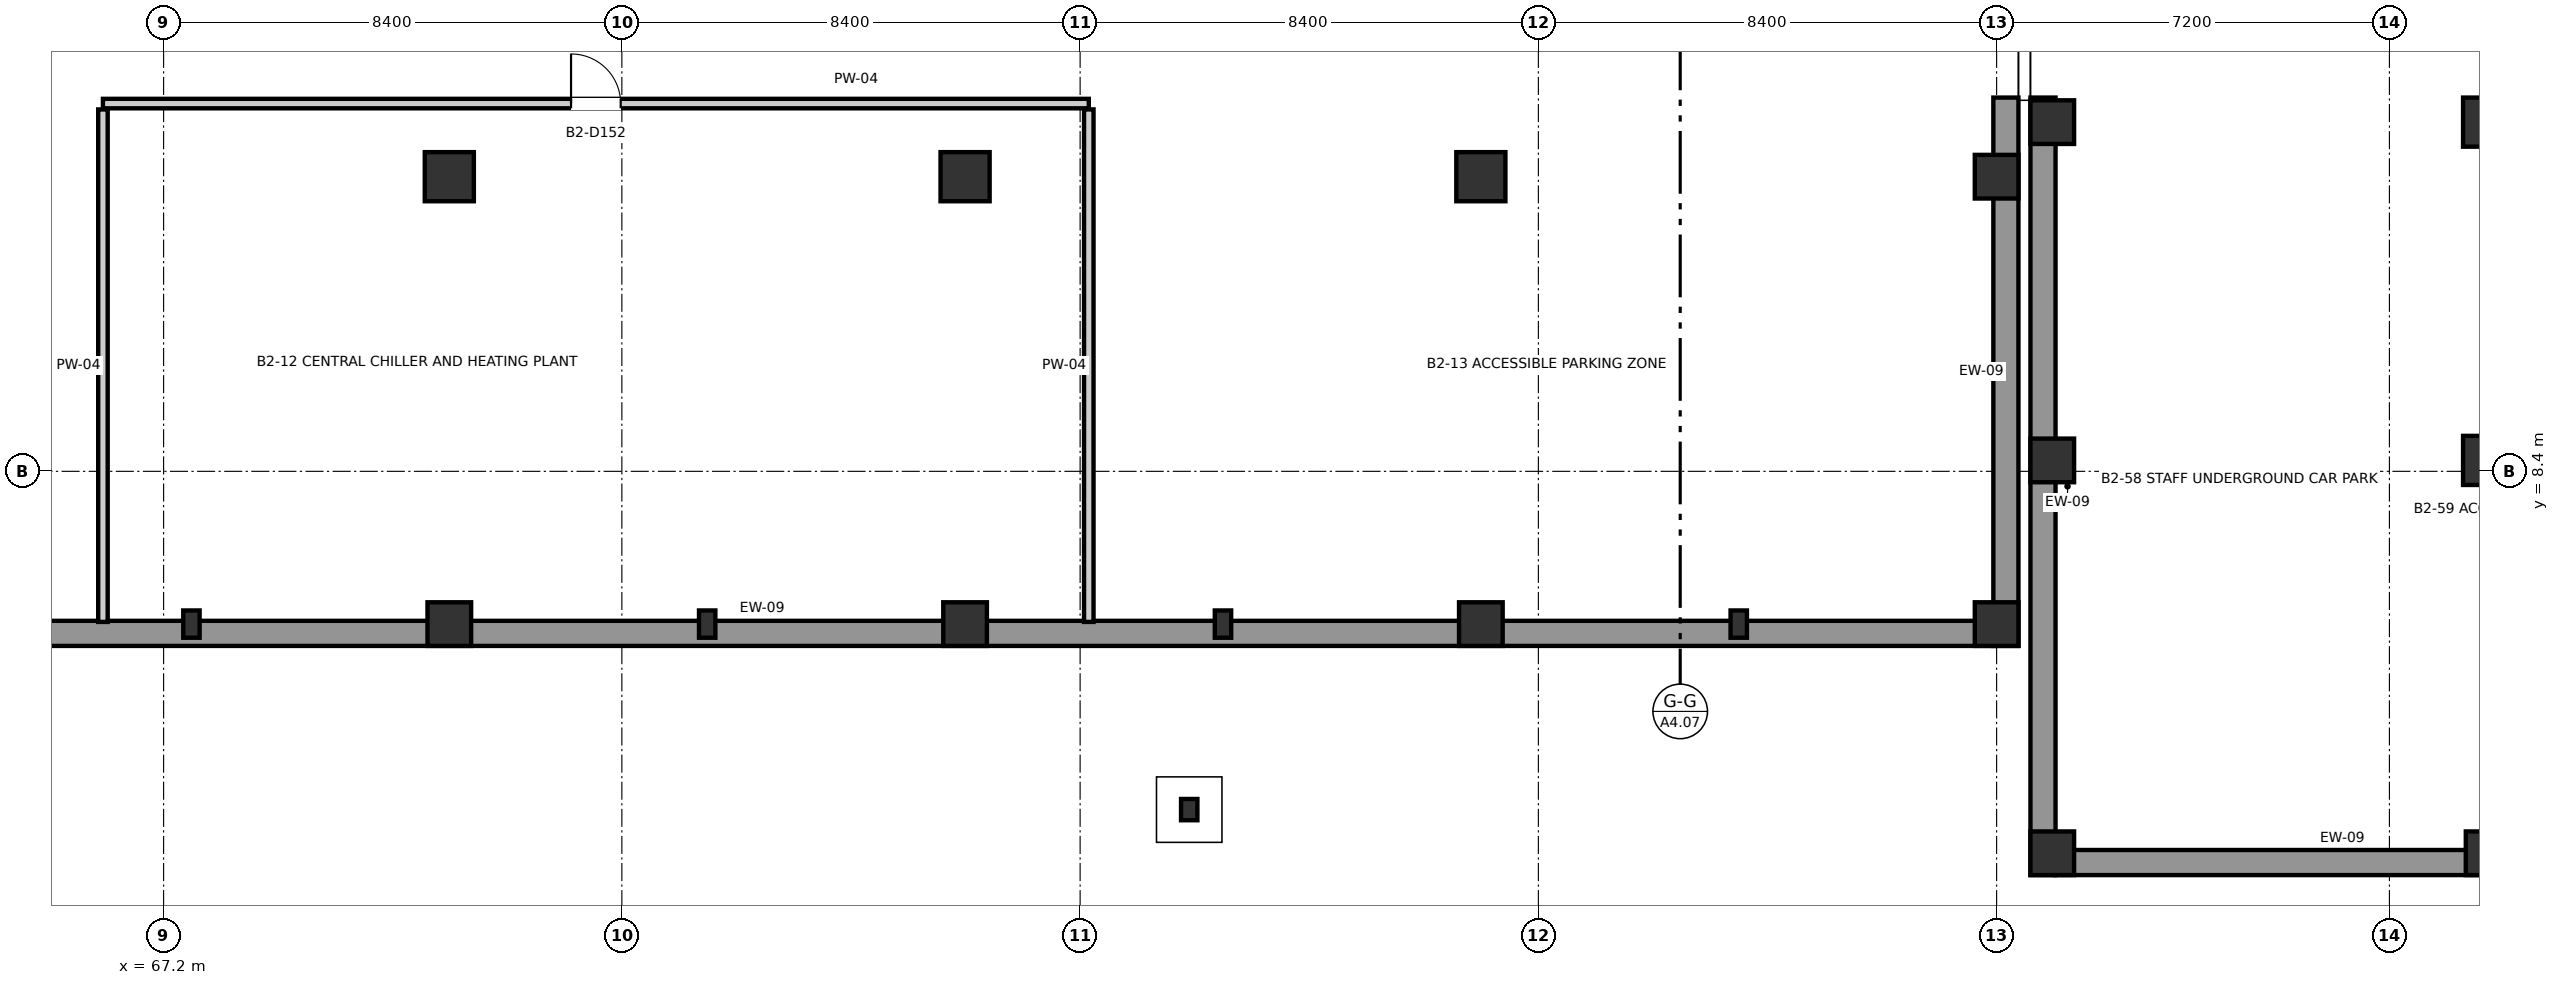
"""IFC4 building model, lengths in metres.
Left out: names, types, materials, properties, quantities, classifications, styles, units other than length and angle.
Written with IfcOpenShell. Run it as: python <this file> out.ifc"""

import sys

from ifc_helpers import new_model, si_unit, direction, frame, frame_2d, origin, origin_2d, place, context, subcontext, project, spatial, rectangle, i_section, extrude, element, fill, save


model = new_model("IFC4")
c1 = context("Model", 3, precision=1e-05, world=origin(), true_north=direction((0.0, 1.0)))
c2 = subcontext(c1, "Body", "Model", "MODEL_VIEW")
j1 = project(units=[si_unit("LENGTHUNIT", "METRE"), si_unit("PLANEANGLEUNIT", "RADIAN")], contexts=[c1])
p1 = place(None, origin())
s1 = spatial("IfcSite", under=j1, at=p1, CompositionType="ELEMENT")
p2 = place(p1, origin())
s2 = spatial("IfcBuilding", under=s1, at=p2, CompositionType="ELEMENT")
p3 = place(p2, frame((0.0, 0.0, -8.4)))
s3 = spatial("IfcBuildingStorey", under=s2, at=p3, CompositionType="ELEMENT", Elevation=-8.4)
p4 = place(p3, frame((86.0, 2.2, 0.0), z_axis=(0.0, 0.0, 1.0), x_axis=(1.0, 0.0, 0.0)))
e1 = element("IfcColumn", 1, at=p4, inside=s3, PredefinedType="COLUMN", context=c2, shape_type="SweptSolid", body=[
    extrude(i_section(OverallWidth=0.3, OverallDepth=0.39, WebThickness=0.011, FlangeThickness=0.019, FilletRadius=0.027, at=origin_2d()), origin(), (0.0, 0.0, 1.0), 4.2),
])
p5 = place(p3, frame((72.437, 5.6, 0.0), z_axis=(0.0, 0.0, 1.0), x_axis=(1.0, 0.0, 0.0)))
e2 = element("IfcColumn", 2, at=p5, inside=s3, PredefinedType="COLUMN", context=c2, shape_type="SweptSolid", body=[
    extrude(rectangle(XDim=0.8, YDim=0.8, at=origin_2d()), origin(), (0.0, 0.0, 1.0), 4.2),
])
p6 = place(p3, frame((72.437, 13.8, 0.0), z_axis=(0.0, 0.0, 1.0), x_axis=(1.0, 0.0, 0.0)))
e3 = element("IfcColumn", 3, at=p6, inside=s3, PredefinedType="COLUMN", context=c2, shape_type="SweptSolid", body=[
    extrude(rectangle(XDim=0.9, YDim=0.9, at=origin_2d()), origin(), (0.0, 0.0, 1.0), 4.2),
])
p7 = place(p3, frame((81.891, 5.6, 0.0), z_axis=(0.0, 0.0, 1.0), x_axis=(1.0, 0.0, 0.0)))
e4 = element("IfcColumn", 4, at=p7, inside=s3, PredefinedType="COLUMN", context=c2, shape_type="SweptSolid", body=[
    extrude(rectangle(XDim=0.8, YDim=0.8, at=origin_2d()), origin(), (0.0, 0.0, 1.0), 4.2),
])
p8 = place(p3, frame((81.891, 13.8, 0.0), z_axis=(0.0, 0.0, 1.0), x_axis=(1.0, 0.0, 0.0)))
e5 = element("IfcColumn", 5, at=p8, inside=s3, PredefinedType="COLUMN", context=c2, shape_type="SweptSolid", body=[
    extrude(rectangle(XDim=0.9, YDim=0.9, at=origin_2d()), origin(), (0.0, 0.0, 1.0), 4.2),
])
p9 = place(p3, frame((91.346, 5.6, 0.0), z_axis=(0.0, 0.0, 1.0), x_axis=(1.0, 0.0, 0.0)))
e6 = element("IfcColumn", 6, at=p9, inside=s3, PredefinedType="COLUMN", context=c2, shape_type="SweptSolid", body=[
    extrude(rectangle(XDim=0.8, YDim=0.8, at=origin_2d()), origin(), (0.0, 0.0, 1.0), 4.2),
])
p10 = place(p3, frame((91.346, 13.8, 0.0), z_axis=(0.0, 0.0, 1.0), x_axis=(1.0, 0.0, 0.0)))
e7 = element("IfcColumn", 7, at=p10, inside=s3, PredefinedType="COLUMN", context=c2, shape_type="SweptSolid", body=[
    extrude(rectangle(XDim=0.9, YDim=0.9, at=origin_2d()), origin(), (0.0, 0.0, 1.0), 4.2),
])
for number, where, z_axis, x_axis in (
    (8, (100.8, 5.6, 0.0), (0.0, 0.0, 1.0), (1.0, 0.0, 0.0)),
    (9, (100.8, 13.8, 0.0), (0.0, 0.0, 1.0), (1.0, 0.0, 0.0)),
    (10, (101.82, 1.4, 0.0), (0.0, 0.0, 1.0), (1.0, 0.0, 0.0)),
    (11, (101.82, 8.6, 0.0), (0.0, 0.0, 1.0), (1.0, 0.0, 0.0)),
    (12, (101.82, 14.8, 0.0), (0.0, 0.0, 1.0), (1.0, 0.0, 0.0)),
    (13, (109.8, 1.4, 0.0), (0.0, 0.0, 1.0), (1.0, 0.0, 0.0)),
):
    element("IfcColumn", number, at=place(p3, frame(where, z_axis=z_axis, x_axis=x_axis)), inside=s3, PredefinedType="COLUMN", context=c2, shape_type="SweptSolid", body=[
        extrude(rectangle(XDim=0.8, YDim=0.8, at=origin_2d()), origin(), (0.0, 0.0, 1.0), 4.2),
    ])
for number, where, z_axis, x_axis in (
    (14, (109.8, 8.6, 0.0), (0.0, 0.0, 1.0), (1.0, 0.0, 0.0)),
    (15, (109.8, 14.8, 0.0), (0.0, 0.0, 1.0), (1.0, 0.0, 0.0)),
):
    element("IfcColumn", number, at=place(p3, frame(where, z_axis=z_axis, x_axis=x_axis)), inside=s3, PredefinedType="COLUMN", context=c2, shape_type="SweptSolid", body=[
        extrude(rectangle(XDim=0.9, YDim=0.9, at=origin_2d()), origin(), (0.0, 0.0, 1.0), 4.2),
    ])
for number, where, z_axis, x_axis in (
    (16, (67.71, 5.6, 0.0), (0.0, 0.0, 1.0), (1.0, 0.0, 0.0)),
    (17, (77.164, 5.6, 0.0), (0.0, 0.0, 1.0), (1.0, 0.0, 0.0)),
    (18, (86.619, 5.6, 0.0), (0.0, 0.0, 1.0), (1.0, 0.0, 0.0)),
    (19, (96.073, 5.6, 0.0), (0.0, 0.0, 1.0), (1.0, 0.0, 0.0)),
):
    element("IfcColumn", number, at=place(p3, frame(where, z_axis=z_axis, x_axis=x_axis)), inside=s3, PredefinedType="COLUMN", context=c2, shape_type="SweptSolid", body=[
        extrude(i_section(OverallWidth=0.3, OverallDepth=0.5, WebThickness=0.014, FlangeThickness=0.028, FilletRadius=0.027, at=origin_2d()), origin(), (0.0, 0.0, 1.0), 4.2),
    ])
p11 = place(p3, frame((34.675, 5.43, 0.0), z_axis=(0.0, 0.0, 1.0), x_axis=(1.0, 0.0, 0.0)))
e20 = element("IfcWall", 20, at=p11, inside=s3, PredefinedType="SOLIDWALL", context=c2, shape_type="SweptSolid", body=[
    extrude(rectangle(XDim=66.07, YDim=0.46, at=frame_2d((33.035, 0.0))), origin(), (0.0, 0.0, 1.0), 4.2),
])
p12 = place(p3, frame((100.97, 5.2, 0.0), z_axis=(0.0, 0.0, 1.0), x_axis=(0.0, 1.0, 0.0)))
e21 = element("IfcWall", 21, at=p12, inside=s3, PredefinedType="SOLIDWALL", context=c2, shape_type="SweptSolid", body=[
    extrude(rectangle(XDim=10.05, YDim=0.46, at=frame_2d((5.025, 0.0))), origin(), (0.0, 0.0, 1.0), 4.2),
])
p13 = place(p3, frame((101.875, 1.23, 0.0), z_axis=(0.0, 0.0, 1.0), x_axis=(1.0, 0.0, 0.0)))
e22 = element("IfcWall", 22, at=p13, inside=s3, PredefinedType="SOLIDWALL", context=c2, shape_type="SweptSolid", body=[
    extrude(rectangle(XDim=63.67, YDim=0.46, at=frame_2d((31.835, 0.0))), origin(), (0.0, 0.0, 1.0), 4.2),
])
p14 = place(p3, frame((101.65, 15.25, 0.0), z_axis=(0.0, 0.0, 1.0), x_axis=(0.0, -1.0, 0.0)))
e23 = element("IfcWall", 23, at=p14, inside=s3, PredefinedType="SOLIDWALL", context=c2, shape_type="SweptSolid", body=[
    extrude(rectangle(XDim=14.25, YDim=0.46, at=frame_2d((7.125, 0.0))), origin(), (0.0, 0.0, 1.0), 4.2),
])
p15 = place(p3, frame((66.088, 15.14, 0.0), z_axis=(0.0, 0.0, 1.0), x_axis=(1.0, 0.0, 0.0)))
e24 = element("IfcWall", 24, at=p15, inside=s3, PredefinedType="PARTITIONING", context=c2, shape_type="SweptSolid", body=[
    extrude(rectangle(XDim=18.071, YDim=0.174, at=frame_2d((9.036, 0.0))), origin(), (0.0, 0.0, 1.0), 3.88),
])
p16 = place(p15, frame((8.581, 0.0, 0.0)))
e25 = element("IfcOpeningElement", 25, at=p16, cuts=e24, PredefinedType="OPENING", context=c2, shape_type="SweptSolid", body=[
    extrude(rectangle(XDim=0.91, YDim=2.04, at=frame_2d((0.455, 1.02))), frame((0.0, 0.102, 0.0), z_axis=(0.0, -1.0, 0.0), x_axis=(1.0, 0.0, 0.0)), (0.0, 0.0, 1.0), 0.204),
])
for number, where, z_axis, x_axis in (
    (26, (66.088, 5.64, 0.0), (0.0, 0.0, 1.0), (0.0, 1.0, 0.0)),
    (27, (84.159, 5.64, 0.0), (0.0, 0.0, 1.0), (0.0, 1.0, 0.0)),
):
    element("IfcWall", number, at=place(p3, frame(where, z_axis=z_axis, x_axis=x_axis)), inside=s3, PredefinedType="PARTITIONING", context=c2, shape_type="SweptSolid", body=[
        extrude(rectangle(XDim=9.393, YDim=0.174, at=frame_2d((4.697, 0.0))), origin(), (0.0, 0.0, 1.0), 3.88),
    ])
p17 = place(p16, frame((0.91, 0.0, 0.0), z_axis=(0.0, 0.0, 1.0), x_axis=(-1.0, 0.0, 0.0)))
e28 = element("IfcDoor", 28, at=p17, inside=s3, OperationType="SINGLE_SWING_LEFT", PredefinedType="DOOR", context=c2, shape_type="SweptSolid", body=[
    extrude(rectangle(XDim=0.91, YDim=2.04, at=frame_2d((0.455, 1.02))), frame((0.0, 0.025, 0.0), z_axis=(0.0, -1.0, 0.0), x_axis=(1.0, 0.0, 0.0)), (0.0, 0.0, 1.0), 0.05),
])
fill(e25, e28)
save(model, sys.argv[1])
